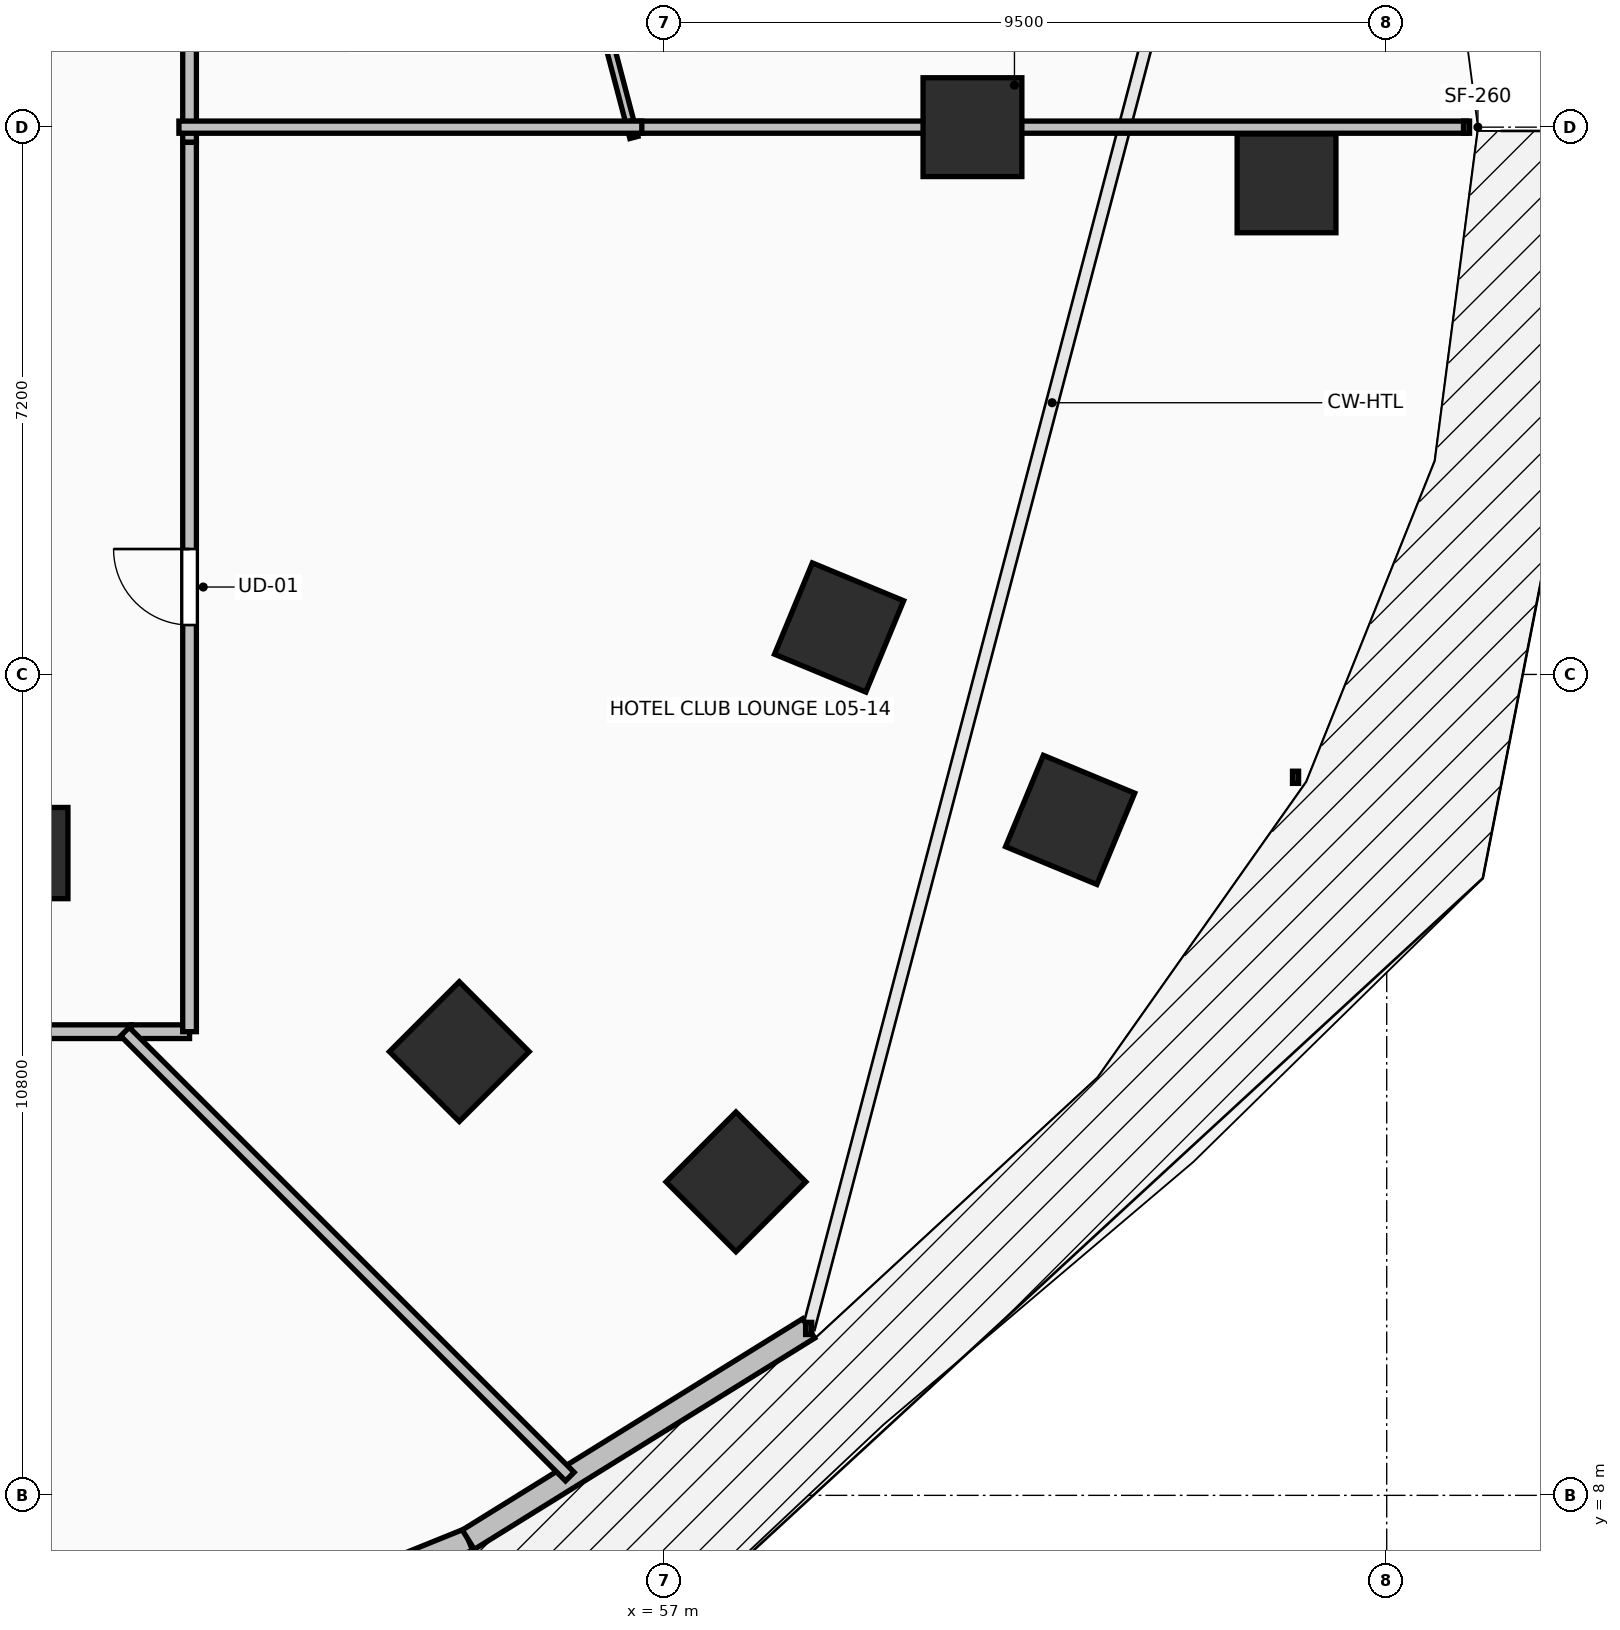
"""IFC4 building model, lengths in metres.
Left out: names, types, materials, properties, quantities, classifications, styles, units other than length and angle.
Written with IfcOpenShell. Run it as: python <this file> out.ifc"""

import sys

from ifc_helpers import new_model, si_unit, direction, frame, frame_2d, origin, origin_2d, place, context, subcontext, project, spatial, rectangle, extrude, element, fill, save


model = new_model("IFC4")
c1 = context("Model", 3, precision=1e-05, world=origin(), true_north=direction((0.0, 1.0)))
c2 = subcontext(c1, "Body", "Model", "MODEL_VIEW")
j1 = project(units=[si_unit("LENGTHUNIT", "METRE"), si_unit("PLANEANGLEUNIT", "RADIAN")], contexts=[c1])
p1 = place(None, origin())
s1 = spatial("IfcSite", under=j1, at=p1, CompositionType="ELEMENT")
p2 = place(p1, origin())
s2 = spatial("IfcBuilding", under=s1, at=p2, CompositionType="ELEMENT")
p3 = place(p2, frame((0.0, 0.0, 24.0)))
s3 = spatial("IfcBuildingStorey", under=s2, at=p3, CompositionType="ELEMENT", Elevation=24.0)
for number, where, z_axis, x_axis in (
    (1, (61.05, 26.0, 0.0), (0.0, 0.0, 1.0), (1.0, 0.0, 0.0)),
    (2, (54.299, 13.838, 0.0), (0.0, 0.0, 1.0), (0.707, -0.707, 0.0)),
    (3, (59.295, 19.418, 0.0), (0.0, 0.0, 1.0), (0.924, -0.383, 0.0)),
    (4, (65.182, 25.261, 0.0), (0.0, 0.0, 1.0), (1.0, 0.0, 0.0)),
    (5, (57.939, 12.124, 0.0), (0.0, 0.0, 1.0), (0.707, -0.707, 0.0)),
    (6, (62.335, 16.886, 0.0), (0.0, 0.0, 1.0), (0.924, -0.383, 0.0)),
):
    element("IfcColumn", number, at=place(p3, frame(where, z_axis=z_axis, x_axis=x_axis)), inside=s3, PredefinedType="COLUMN", context=c2, shape_type="SweptSolid", body=[
        extrude(rectangle(XDim=1.3, YDim=1.3, at=origin_2d()), origin(), (0.0, 0.0, 1.0), 3.5),
    ])
p4 = place(p3, frame((48.75, 16.45, 0.0), z_axis=(0.0, 0.0, 1.0), x_axis=(1.0, 0.0, 0.0)))
e7 = element("IfcColumn", 7, at=p4, inside=s3, PredefinedType="PILASTER", context=c2, shape_type="SweptSolid", body=[
    extrude(rectangle(XDim=0.8, YDim=1.2, at=origin_2d()), origin(), (0.0, 0.0, 1.0), 3.5),
])
p5 = place(p3, frame((49.308, 5.351, 0.0), z_axis=(0.0, 0.0, 1.0), x_axis=(0.927095325176, 0.374825636845, 0.0)))
e8 = element("IfcWall", 8, at=p5, inside=s3, PredefinedType="STANDARD", context=c2, shape_type="SweptSolid", body=[
    extrude(rectangle(XDim=5.51, YDim=0.3, at=frame_2d((2.755, 0.0))), origin(), (0.0, 0.0, 1.0), 3.24),
])
p6 = place(p5, frame((1.955, 0.0, 0.0)))
e9 = element("IfcOpeningElement", 9, at=p6, cuts=e8, PredefinedType="OPENING", context=c2, shape_type="SweptSolid", body=[
    extrude(rectangle(XDim=1.6, YDim=2.3, at=frame_2d((0.8, 1.15))), frame((0.0, 0.165, 0.0), z_axis=(0.0, -1.0, 0.0), x_axis=(1.0, 0.0, 0.0)), (0.0, 0.0, 1.0), 0.33),
])
p7 = place(p3, frame((54.417, 7.417, 0.0), z_axis=(0.0, 0.0, 1.0), x_axis=(0.849633724826, 0.527373239404, 0.0)))
e10 = element("IfcWall", 10, at=p7, inside=s3, PredefinedType="STANDARD", context=c2, shape_type="SweptSolid", body=[
    extrude(rectangle(XDim=5.271, YDim=0.3, at=frame_2d((2.635, 0.0))), origin(), (0.0, 0.0, 1.0), 3.24),
])
p8 = place(p3, frame((50.75, 25.8, 0.0), z_axis=(0.0, 0.0, 1.0), x_axis=(0.0, 1.0, 0.0)))
e11 = element("IfcWall", 11, at=p8, inside=s3, PredefinedType="PARTITIONING", context=c2, shape_type="SweptSolid", body=[
    extrude(rectangle(XDim=2.505, YDim=0.18, at=frame_2d((1.252, 0.0))), origin(), (0.0, 0.0, 1.0), 2.432),
])
p9 = place(p3, frame((42.34, 14.1, 0.0), z_axis=(0.0, 0.0, 1.0), x_axis=(1.0, 0.0, 0.0)))
e12 = element("IfcWall", 12, at=p9, inside=s3, PredefinedType="PARTITIONING", context=c2, shape_type="SweptSolid", body=[
    extrude(rectangle(XDim=7.645, YDim=0.18, at=frame_2d((3.823, 0.0))), origin(), (0.0, 0.0, 1.0), 2.432),
])
p10 = place(p9, frame((3.298, 0.0, 0.0)))
e13 = element("IfcOpeningElement", 13, at=p10, cuts=e12, PredefinedType="OPENING", context=c2, shape_type="SweptSolid", body=[
    extrude(rectangle(XDim=1.05, YDim=2.2, at=frame_2d((0.525, 1.1))), frame((0.0, 0.105, 0.0), z_axis=(0.0, -1.0, 0.0), x_axis=(1.0, 0.0, 0.0)), (0.0, 0.0, 1.0), 0.21),
])
p11 = place(p3, frame((49.985, 14.1, 0.0), z_axis=(0.0, 0.0, 1.0), x_axis=(1.0, 0.0, 0.0)))
e14 = element("IfcWall", 14, at=p11, inside=s3, PredefinedType="PARTITIONING", context=c2, shape_type="SweptSolid", body=[
    extrude(rectangle(XDim=0.765, YDim=0.18, at=frame_2d((0.382, 0.0))), origin(), (0.0, 0.0, 1.0), 3.24),
])
p12 = place(p3, frame((50.75, 14.1, 0.0), z_axis=(0.0, 0.0, 1.0), x_axis=(0.0, 1.0, 0.0)))
e15 = element("IfcWall", 15, at=p12, inside=s3, PredefinedType="PARTITIONING", context=c2, shape_type="SweptSolid", body=[
    extrude(rectangle(XDim=11.7, YDim=0.18, at=frame_2d((5.85, 0.0))), origin(), (0.0, 0.0, 1.0), 2.432),
])
p13 = place(p12, frame((5.35, 0.0, 0.0)))
e16 = element("IfcOpeningElement", 16, at=p13, cuts=e15, PredefinedType="OPENING", context=c2, shape_type="SweptSolid", body=[
    extrude(rectangle(XDim=1.0, YDim=2.15, at=frame_2d((0.5, 1.075))), frame((0.0, 0.105, 0.0), z_axis=(0.0, -1.0, 0.0), x_axis=(1.0, 0.0, 0.0)), (0.0, 0.0, 1.0), 0.21),
])
p14 = place(p3, frame((55.709, 29.232, 0.0), z_axis=(0.0, 0.0, 1.0), x_axis=(0.254476045764, -0.967079077497, 0.0)))
e17 = element("IfcWall", 17, at=p14, inside=s3, PredefinedType="PARTITIONING", context=c2, shape_type="SweptSolid", body=[
    extrude(rectangle(XDim=3.483, YDim=0.11, at=frame_2d((1.741, 0.0))), origin(), (0.0, 0.0, 1.0), 2.432),
])
p15 = place(p3, frame((56.56, 26.0, 0.0), z_axis=(0.0, 0.0, 1.0), x_axis=(1.0, 0.0, 0.0)))
e18 = element("IfcWall", 18, at=p15, inside=s3, PredefinedType="PARTITIONING", context=c2, shape_type="SweptSolid", body=[
    extrude(rectangle(XDim=10.989, YDim=0.16, at=frame_2d((5.495, 0.0))), origin(), (0.0, 0.0, 1.0), 2.432),
])
p16 = place(p3, frame((50.61, 26.0, 0.0), z_axis=(0.0, 0.0, 1.0), x_axis=(1.0, 0.0, 0.0)))
e19 = element("IfcWall", 19, at=p16, inside=s3, PredefinedType="PARTITIONING", context=c2, shape_type="SweptSolid", body=[
    extrude(rectangle(XDim=6.09, YDim=0.16, at=frame_2d((3.045, 0.0))), origin(), (0.0, 0.0, 1.0), 2.432),
])
p17 = place(p3, frame((55.753, 8.247, 0.0), z_axis=(0.0, 0.0, 1.0), x_axis=(-0.707106781187, 0.707106781187, 0.0)))
e20 = element("IfcWall", 20, at=p17, inside=s3, PredefinedType="PARTITIONING", context=c2, shape_type="SweptSolid", body=[
    extrude(rectangle(XDim=8.277, YDim=0.16, at=frame_2d((4.139, 0.0))), origin(), (0.0, 0.0, 1.0), 2.624),
])
p18 = place(p13, origin())
e21 = element("IfcDoor", 21, at=p18, inside=s3, OperationType="SINGLE_SWING_RIGHT", PredefinedType="DOOR", context=c2, shape_type="SweptSolid", body=[
    extrude(rectangle(XDim=1.0, YDim=2.15, at=frame_2d((0.5, 1.075))), frame((0.0, 0.025, 0.0), z_axis=(0.0, -1.0, 0.0), x_axis=(1.0, 0.0, 0.0)), (0.0, 0.0, 1.0), 0.05),
])
fill(e16, e21)
save(model, sys.argv[1])
